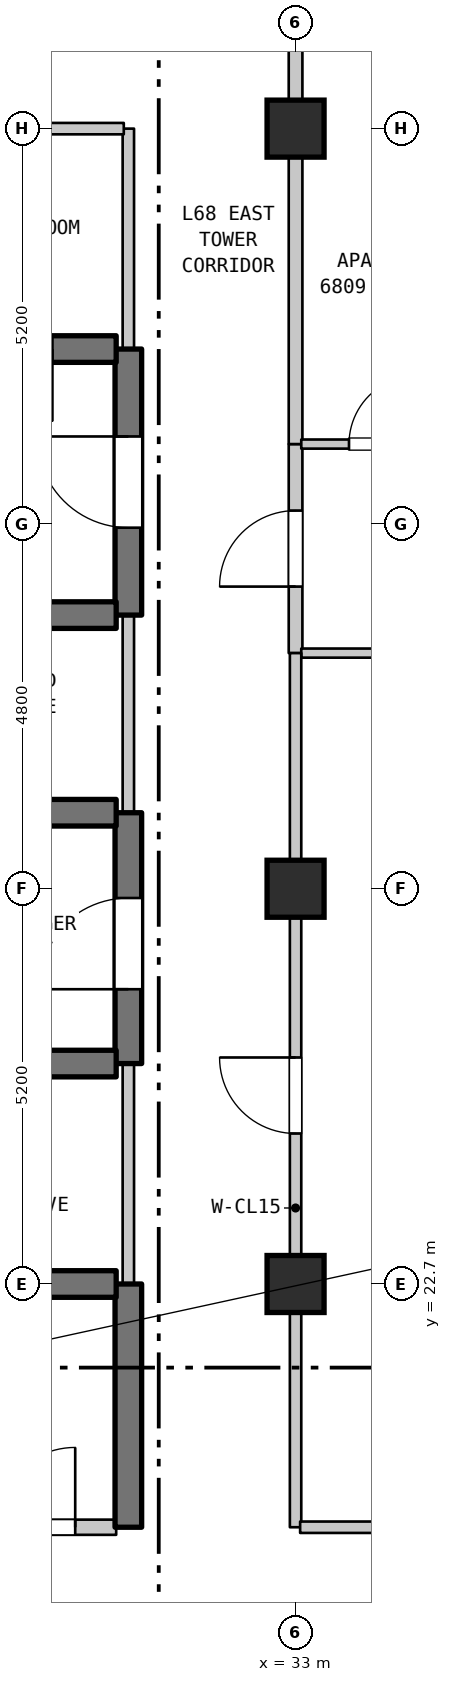
"""IFC4 building model, lengths in metres.
Left out: names, types, materials, properties, quantities, classifications, styles, units other than length and angle.
Written with IfcOpenShell. Run it as: python <this file> out.ifc"""

import sys

from ifc_helpers import new_model, si_unit, direction, frame, frame_2d, origin, origin_2d, place, context, subcontext, project, spatial, rectangle, extrude, element, fill, save


model = new_model("IFC4")
c1 = context("Model", 3, precision=1e-05, world=origin(), true_north=direction((0.0, 1.0)))
c2 = subcontext(c1, "Body", "Model", "MODEL_VIEW")
j1 = project(units=[si_unit("LENGTHUNIT", "METRE"), si_unit("PLANEANGLEUNIT", "RADIAN")], contexts=[c1])
p1 = place(None, origin())
s1 = spatial("IfcSite", under=j1, at=p1, CompositionType="ELEMENT")
p2 = place(p1, origin())
s2 = spatial("IfcBuilding", under=s1, at=p2, CompositionType="ELEMENT")
p3 = place(p2, frame((0.0, 0.0, 273.2)))
s3 = spatial("IfcBuildingStorey", under=s2, at=p3, CompositionType="ELEMENT", Elevation=273.2)
for number, where, z_axis, x_axis in (
    (1, (33.0, 22.7, 0.0), (0.0, 0.0, 1.0), (1.0, 0.0, 0.0)),
    (2, (33.0, 27.9, 0.0), (0.0, 0.0, 1.0), (1.0, 0.0, 0.0)),
    (3, (33.0, 37.9, 0.0), (0.0, 0.0, 1.0), (1.0, 0.0, 0.0)),
):
    element("IfcColumn", number, at=place(p3, frame(where, z_axis=z_axis, x_axis=x_axis)), inside=s3, PredefinedType="COLUMN", context=c2, shape_type="SweptSolid", body=[
        extrude(rectangle(XDim=0.75, YDim=0.75, at=origin_2d()), origin(), (0.0, 0.0, 1.0), 3.7),
    ])
p4 = place(p3, frame((30.8, 19.5, 0.0), z_axis=(0.0, 0.0, 1.0), x_axis=(0.0, 1.0, 0.0)))
e4 = element("IfcWall", 4, at=p4, inside=s3, PredefinedType="SHEAR", context=c2, shape_type="SweptSolid", body=[
    extrude(rectangle(XDim=3.2, YDim=0.35, at=frame_2d((1.6, 0.0))), origin(), (0.0, 0.0, 1.0), 3.39),
])
p5 = place(p3, frame((30.8, 22.7, 0.0), z_axis=(0.0, 0.0, 1.0), x_axis=(0.0, 1.0, 0.0)))
e5 = element("IfcWall", 5, at=p5, inside=s3, PredefinedType="STANDARD", context=c2, shape_type="SweptSolid", body=[
    extrude(rectangle(XDim=2.9, YDim=0.15, at=frame_2d((1.45, 0.0))), origin(), (0.0, 0.0, 1.0), 3.39),
])
p6 = place(p3, frame((30.8, 25.6, 0.0), z_axis=(0.0, 0.0, 1.0), x_axis=(0.0, 1.0, 0.0)))
e6 = element("IfcWall", 6, at=p6, inside=s3, PredefinedType="SHEAR", context=c2, shape_type="SweptSolid", body=[
    extrude(rectangle(XDim=3.3, YDim=0.35, at=frame_2d((1.65, 0.0))), origin(), (0.0, 0.0, 1.0), 3.39),
])
p7 = place(p6, frame((0.978, 0.0, 0.0)))
e7 = element("IfcOpeningElement", 7, at=p7, cuts=e6, PredefinedType="OPENING", context=c2, shape_type="SweptSolid", body=[
    extrude(rectangle(XDim=1.2, YDim=2.2, at=frame_2d((0.6, 1.1))), frame((0.0, 0.185, 0.0), z_axis=(0.0, -1.0, 0.0), x_axis=(1.0, 0.0, 0.0)), (0.0, 0.0, 1.0), 0.37),
])
p8 = place(p3, frame((30.8, 28.9, 0.0), z_axis=(0.0, 0.0, 1.0), x_axis=(0.0, 1.0, 0.0)))
e8 = element("IfcWall", 8, at=p8, inside=s3, PredefinedType="STANDARD", context=c2, shape_type="SweptSolid", body=[
    extrude(rectangle(XDim=2.6, YDim=0.15, at=frame_2d((1.3, 0.0))), origin(), (0.0, 0.0, 1.0), 3.39),
])
p9 = place(p3, frame((30.8, 31.5, 0.0), z_axis=(0.0, 0.0, 1.0), x_axis=(0.0, 1.0, 0.0)))
e9 = element("IfcWall", 9, at=p9, inside=s3, PredefinedType="SHEAR", context=c2, shape_type="SweptSolid", body=[
    extrude(rectangle(XDim=3.5, YDim=0.35, at=frame_2d((1.75, 0.0))), origin(), (0.0, 0.0, 1.0), 3.39),
])
p10 = place(p9, frame((1.15, 0.0, 0.0)))
e10 = element("IfcOpeningElement", 10, at=p10, cuts=e9, PredefinedType="OPENING", context=c2, shape_type="SweptSolid", body=[
    extrude(rectangle(XDim=1.2, YDim=2.2, at=frame_2d((0.6, 1.1))), frame((0.0, 0.185, 0.0), z_axis=(0.0, -1.0, 0.0), x_axis=(1.0, 0.0, 0.0)), (0.0, 0.0, 1.0), 0.37),
])
p11 = place(p3, frame((30.8, 35.0, 0.0), z_axis=(0.0, 0.0, 1.0), x_axis=(0.0, 1.0, 0.0)))
e11 = element("IfcWall", 11, at=p11, inside=s3, PredefinedType="STANDARD", context=c2, shape_type="SweptSolid", body=[
    extrude(rectangle(XDim=2.9, YDim=0.15, at=frame_2d((1.45, 0.0))), origin(), (0.0, 0.0, 1.0), 3.39),
])
p12 = place(p3, frame((33.0, 19.5, 0.0), z_axis=(0.0, 0.0, 1.0), x_axis=(0.0, 1.0, 0.0)))
e12 = element("IfcWall", 12, at=p12, inside=s3, PredefinedType="STANDARD", context=c2, shape_type="SweptSolid", body=[
    extrude(rectangle(XDim=8.4, YDim=0.15, at=frame_2d((4.2, 0.0))), origin(), (0.0, 0.0, 1.0), 3.1),
])
p13 = place(p12, frame((5.18, 0.0, 0.0)))
e13 = element("IfcOpeningElement", 13, at=p13, cuts=e12, PredefinedType="OPENING", context=c2, shape_type="SweptSolid", body=[
    extrude(rectangle(XDim=1.0, YDim=2.15, at=frame_2d((0.5, 1.075))), frame((0.0, 0.085, 0.0), z_axis=(0.0, -1.0, 0.0), x_axis=(1.0, 0.0, 0.0)), (0.0, 0.0, 1.0), 0.17),
])
p14 = place(p3, frame((33.0, 31.0, 0.0), z_axis=(0.0, 0.0, 1.0), x_axis=(0.0, 1.0, 0.0)))
e14 = element("IfcWall", 14, at=p14, inside=s3, PredefinedType="STANDARD", context=c2, shape_type="SweptSolid", body=[
    extrude(rectangle(XDim=2.75, YDim=0.18, at=frame_2d((1.375, 0.0))), origin(), (0.0, 0.0, 1.0), 2.89),
])
p15 = place(p14, frame((0.875, 0.0, 0.0)))
e15 = element("IfcOpeningElement", 15, at=p15, cuts=e14, PredefinedType="OPENING", context=c2, shape_type="SweptSolid", body=[
    extrude(rectangle(XDim=1.0, YDim=2.15, at=frame_2d((0.5, 1.075))), frame((0.0, 0.1, 0.0), z_axis=(0.0, -1.0, 0.0), x_axis=(1.0, 0.0, 0.0)), (0.0, 0.0, 1.0), 0.2),
])
p16 = place(p3, frame((33.0, 33.75, 0.0), z_axis=(0.0, 0.0, 1.0), x_axis=(0.0, 1.0, 0.0)))
e16 = element("IfcWall", 16, at=p16, inside=s3, PredefinedType="STANDARD", context=c2, shape_type="SweptSolid", body=[
    extrude(rectangle(XDim=4.15, YDim=0.18, at=frame_2d((2.075, 0.0))), origin(), (0.0, 0.0, 1.0), 2.89),
])
p17 = place(p3, frame((28.585, 19.5, 0.0), z_axis=(0.0, 0.0, 1.0), x_axis=(1.0, 0.0, 0.0)))
e17 = element("IfcWall", 17, at=p17, inside=s3, PredefinedType="STANDARD", context=c2, shape_type="SweptSolid", body=[
    extrude(rectangle(XDim=2.055, YDim=0.2, at=frame_2d((1.027, 0.0))), origin(), (0.0, 0.0, 1.0), 3.39),
])
p18 = place(p17, frame((0.466, 0.0, 0.0)))
e18 = element("IfcOpeningElement", 18, at=p18, cuts=e17, PredefinedType="OPENING", context=c2, shape_type="SweptSolid", body=[
    extrude(rectangle(XDim=1.05, YDim=2.15, at=frame_2d((0.525, 1.075))), frame((0.0, 0.11, 0.0), z_axis=(0.0, -1.0, 0.0), x_axis=(1.0, 0.0, 0.0)), (0.0, 0.0, 1.0), 0.22),
])
p19 = place(p3, frame((33.06, 19.5, 0.0), z_axis=(0.0, 0.0, 1.0), x_axis=(1.0, 0.0, 0.0)))
e19 = element("IfcWall", 19, at=p19, inside=s3, PredefinedType="STANDARD", context=c2, shape_type="SweptSolid", body=[
    extrude(rectangle(XDim=8.323, YDim=0.15, at=frame_2d((4.162, 0.0))), origin(), (0.0, 0.0, 1.0), 3.39),
])
p20 = place(p19, frame((3.583, 0.0, 0.0)))
e20 = element("IfcOpeningElement", 20, at=p20, cuts=e19, PredefinedType="OPENING", context=c2, shape_type="SweptSolid", body=[
    extrude(rectangle(XDim=1.0, YDim=2.15, at=frame_2d((0.5, 1.075))), frame((0.0, 0.085, 0.0), z_axis=(0.0, -1.0, 0.0), x_axis=(1.0, 0.0, 0.0)), (0.0, 0.0, 1.0), 0.17),
])
p21 = place(p3, frame((28.585, 22.7, 0.0), z_axis=(0.0, 0.0, 1.0), x_axis=(1.0, 0.0, 0.0)))
e21 = element("IfcWall", 21, at=p21, inside=s3, PredefinedType="SHEAR", context=c2, shape_type="SweptSolid", body=[
    extrude(rectangle(XDim=2.055, YDim=0.35, at=frame_2d((1.027, 0.0))), origin(), (0.0, 0.0, 1.0), 3.39),
])
p22 = place(p3, frame((27.46, 25.6, 0.0), z_axis=(0.0, 0.0, 1.0), x_axis=(1.0, 0.0, 0.0)))
e22 = element("IfcWall", 22, at=p22, inside=s3, PredefinedType="SHEAR", context=c2, shape_type="SweptSolid", body=[
    extrude(rectangle(XDim=3.18, YDim=0.35, at=frame_2d((1.59, 0.0))), origin(), (0.0, 0.0, 1.0), 3.39),
])
p23 = place(p22, frame((1.115, 0.0, 0.0)))
e23 = element("IfcOpeningElement", 23, at=p23, cuts=e22, PredefinedType="OPENING", context=c2, shape_type="SweptSolid", body=[
    extrude(rectangle(XDim=0.95, YDim=2.15, at=frame_2d((0.475, 1.075))), frame((0.0, 0.185, 0.0), z_axis=(0.0, -1.0, 0.0), x_axis=(1.0, 0.0, 0.0)), (0.0, 0.0, 1.0), 0.37),
])
p24 = place(p3, frame((27.46, 28.9, 0.0), z_axis=(0.0, 0.0, 1.0), x_axis=(1.0, 0.0, 0.0)))
e24 = element("IfcWall", 24, at=p24, inside=s3, PredefinedType="SHEAR", context=c2, shape_type="SweptSolid", body=[
    extrude(rectangle(XDim=3.18, YDim=0.35, at=frame_2d((1.59, 0.0))), origin(), (0.0, 0.0, 1.0), 3.39),
])
p25 = place(p24, frame((1.115, 0.0, 0.0)))
e25 = element("IfcOpeningElement", 25, at=p25, cuts=e24, PredefinedType="OPENING", context=c2, shape_type="SweptSolid", body=[
    extrude(rectangle(XDim=0.95, YDim=2.15, at=frame_2d((0.475, 1.075))), frame((0.0, 0.185, 0.0), z_axis=(0.0, -1.0, 0.0), x_axis=(1.0, 0.0, 0.0)), (0.0, 0.0, 1.0), 0.37),
])
p26 = place(p3, frame((33.075, 31.0, 0.0), z_axis=(0.0, 0.0, 1.0), x_axis=(1.0, 0.0, 0.0)))
e26 = element("IfcWall", 26, at=p26, inside=s3, PredefinedType="PARTITIONING", context=c2, shape_type="SweptSolid", body=[
    extrude(rectangle(XDim=11.199, YDim=0.12, at=frame_2d((5.6, 0.0))), origin(), (0.0, 0.0, 1.0), 3.39),
])
p27 = place(p3, frame((27.46, 31.5, 0.0), z_axis=(0.0, 0.0, 1.0), x_axis=(1.0, 0.0, 0.0)))
e27 = element("IfcWall", 27, at=p27, inside=s3, PredefinedType="SHEAR", context=c2, shape_type="SweptSolid", body=[
    extrude(rectangle(XDim=3.18, YDim=0.35, at=frame_2d((1.59, 0.0))), origin(), (0.0, 0.0, 1.0), 3.39),
])
p28 = place(p3, frame((33.075, 33.75, 0.0), z_axis=(0.0, 0.0, 1.0), x_axis=(1.0, 0.0, 0.0)))
e28 = element("IfcWall", 28, at=p28, inside=s3, PredefinedType="PARTITIONING", context=c2, shape_type="SweptSolid", body=[
    extrude(rectangle(XDim=2.335, YDim=0.12, at=frame_2d((1.167, 0.0))), origin(), (0.0, 0.0, 1.0), 3.39),
])
p29 = place(p28, frame((0.628, 0.0, 0.0)))
e29 = element("IfcOpeningElement", 29, at=p29, cuts=e28, PredefinedType="OPENING", context=c2, shape_type="SweptSolid", body=[
    extrude(rectangle(XDim=0.9, YDim=2.15, at=frame_2d((0.45, 1.075))), frame((0.0, 0.07, 0.0), z_axis=(0.0, -1.0, 0.0), x_axis=(1.0, 0.0, 0.0)), (0.0, 0.0, 1.0), 0.14),
])
p30 = place(p3, frame((28.045, 35.0, 0.0), z_axis=(0.0, 0.0, 1.0), x_axis=(1.0, 0.0, 0.0)))
e30 = element("IfcWall", 30, at=p30, inside=s3, PredefinedType="SHEAR", context=c2, shape_type="SweptSolid", body=[
    extrude(rectangle(XDim=2.595, YDim=0.35, at=frame_2d((1.297, 0.0))), origin(), (0.0, 0.0, 1.0), 3.39),
])
p31 = place(p30, frame((0.806, 0.0, 0.0)))
e31 = element("IfcOpeningElement", 31, at=p31, cuts=e30, PredefinedType="OPENING", context=c2, shape_type="SweptSolid", body=[
    extrude(rectangle(XDim=0.95, YDim=2.15, at=frame_2d((0.475, 1.075))), frame((0.0, 0.185, 0.0), z_axis=(0.0, -1.0, 0.0), x_axis=(1.0, 0.0, 0.0)), (0.0, 0.0, 1.0), 0.37),
])
p32 = place(p3, frame((28.045, 37.9, 0.0), z_axis=(0.0, 0.0, 1.0), x_axis=(1.0, 0.0, 0.0)))
e32 = element("IfcWall", 32, at=p32, inside=s3, PredefinedType="STANDARD", context=c2, shape_type="SweptSolid", body=[
    extrude(rectangle(XDim=2.695, YDim=0.15, at=frame_2d((1.348, 0.0))), origin(), (0.0, 0.0, 1.0), 2.89),
])
p33 = place(p3, frame((33.0, 27.9, 0.0), z_axis=(0.0, 0.0, 1.0), x_axis=(0.0, 1.0, 0.0)))
e33 = element("IfcWall", 33, at=p33, inside=s3, PredefinedType="STANDARD", context=c2, shape_type="SweptSolid", body=[
    extrude(rectangle(XDim=3.1, YDim=0.15, at=frame_2d((1.55, 0.0))), origin(), (0.0, 0.0, 1.0), 2.89),
])
p34 = place(p3, frame((33.0, 37.9, 0.0), z_axis=(0.0, 0.0, 1.0), x_axis=(0.0, 1.0, 0.0)))
e34 = element("IfcWall", 34, at=p34, inside=s3, PredefinedType="STANDARD", context=c2, shape_type="SweptSolid", body=[
    extrude(rectangle(XDim=2.2, YDim=0.18, at=frame_2d((1.1, 0.0))), origin(), (0.0, 0.0, 1.0), 2.79),
])
p35 = place(p7, origin())
e35 = element("IfcDoor", 35, at=p35, inside=s3, OperationType="SINGLE_SWING_LEFT", PredefinedType="DOOR", context=c2, shape_type="SweptSolid", body=[
    extrude(rectangle(XDim=1.2, YDim=2.2, at=frame_2d((0.6, 1.1))), frame((0.0, 0.025, 0.0), z_axis=(0.0, -1.0, 0.0), x_axis=(1.0, 0.0, 0.0)), (0.0, 0.0, 1.0), 0.05),
])
fill(e7, e35)
p36 = place(p10, origin())
e36 = element("IfcDoor", 36, at=p36, inside=s3, OperationType="SINGLE_SWING_RIGHT", PredefinedType="DOOR", context=c2, shape_type="SweptSolid", body=[
    extrude(rectangle(XDim=1.2, YDim=2.2, at=frame_2d((0.6, 1.1))), frame((0.0, 0.025, 0.0), z_axis=(0.0, -1.0, 0.0), x_axis=(1.0, 0.0, 0.0)), (0.0, 0.0, 1.0), 0.05),
])
fill(e10, e36)
p37 = place(p13, origin())
e37 = element("IfcDoor", 37, at=p37, inside=s3, OperationType="SINGLE_SWING_RIGHT", PredefinedType="DOOR", context=c2, shape_type="SweptSolid", body=[
    extrude(rectangle(XDim=1.0, YDim=2.15, at=frame_2d((0.5, 1.075))), frame((0.0, 0.025, 0.0), z_axis=(0.0, -1.0, 0.0), x_axis=(1.0, 0.0, 0.0)), (0.0, 0.0, 1.0), 0.05),
])
fill(e13, e37)
p38 = place(p15, origin())
e38 = element("IfcDoor", 38, at=p38, inside=s3, OperationType="SINGLE_SWING_LEFT", PredefinedType="DOOR", context=c2, shape_type="SweptSolid", body=[
    extrude(rectangle(XDim=1.0, YDim=2.15, at=frame_2d((0.5, 1.075))), frame((0.0, 0.025, 0.0), z_axis=(0.0, -1.0, 0.0), x_axis=(1.0, 0.0, 0.0)), (0.0, 0.0, 1.0), 0.05),
])
fill(e15, e38)
p39 = place(p18, origin())
e39 = element("IfcDoor", 39, at=p39, inside=s3, OperationType="SINGLE_SWING_RIGHT", PredefinedType="DOOR", context=c2, shape_type="SweptSolid", body=[
    extrude(rectangle(XDim=1.05, YDim=2.15, at=frame_2d((0.525, 1.075))), frame((0.0, 0.025, 0.0), z_axis=(0.0, -1.0, 0.0), x_axis=(1.0, 0.0, 0.0)), (0.0, 0.0, 1.0), 0.05),
])
fill(e18, e39)
p40 = place(p29, origin())
e40 = element("IfcDoor", 40, at=p40, inside=s3, OperationType="SINGLE_SWING_RIGHT", PredefinedType="DOOR", context=c2, shape_type="SweptSolid", body=[
    extrude(rectangle(XDim=0.9, YDim=2.15, at=frame_2d((0.45, 1.075))), frame((0.0, 0.025, 0.0), z_axis=(0.0, -1.0, 0.0), x_axis=(1.0, 0.0, 0.0)), (0.0, 0.0, 1.0), 0.05),
])
fill(e29, e40)
p41 = place(p31, frame((0.95, 0.0, 0.0), z_axis=(0.0, 0.0, 1.0), x_axis=(-1.0, 0.0, 0.0)))
e41 = element("IfcDoor", 41, at=p41, inside=s3, OperationType="SINGLE_SWING_RIGHT", PredefinedType="DOOR", context=c2, shape_type="SweptSolid", body=[
    extrude(rectangle(XDim=0.95, YDim=2.15, at=frame_2d((0.475, 1.075))), frame((0.0, 0.025, 0.0), z_axis=(0.0, -1.0, 0.0), x_axis=(1.0, 0.0, 0.0)), (0.0, 0.0, 1.0), 0.05),
])
fill(e31, e41)
save(model, sys.argv[1])
